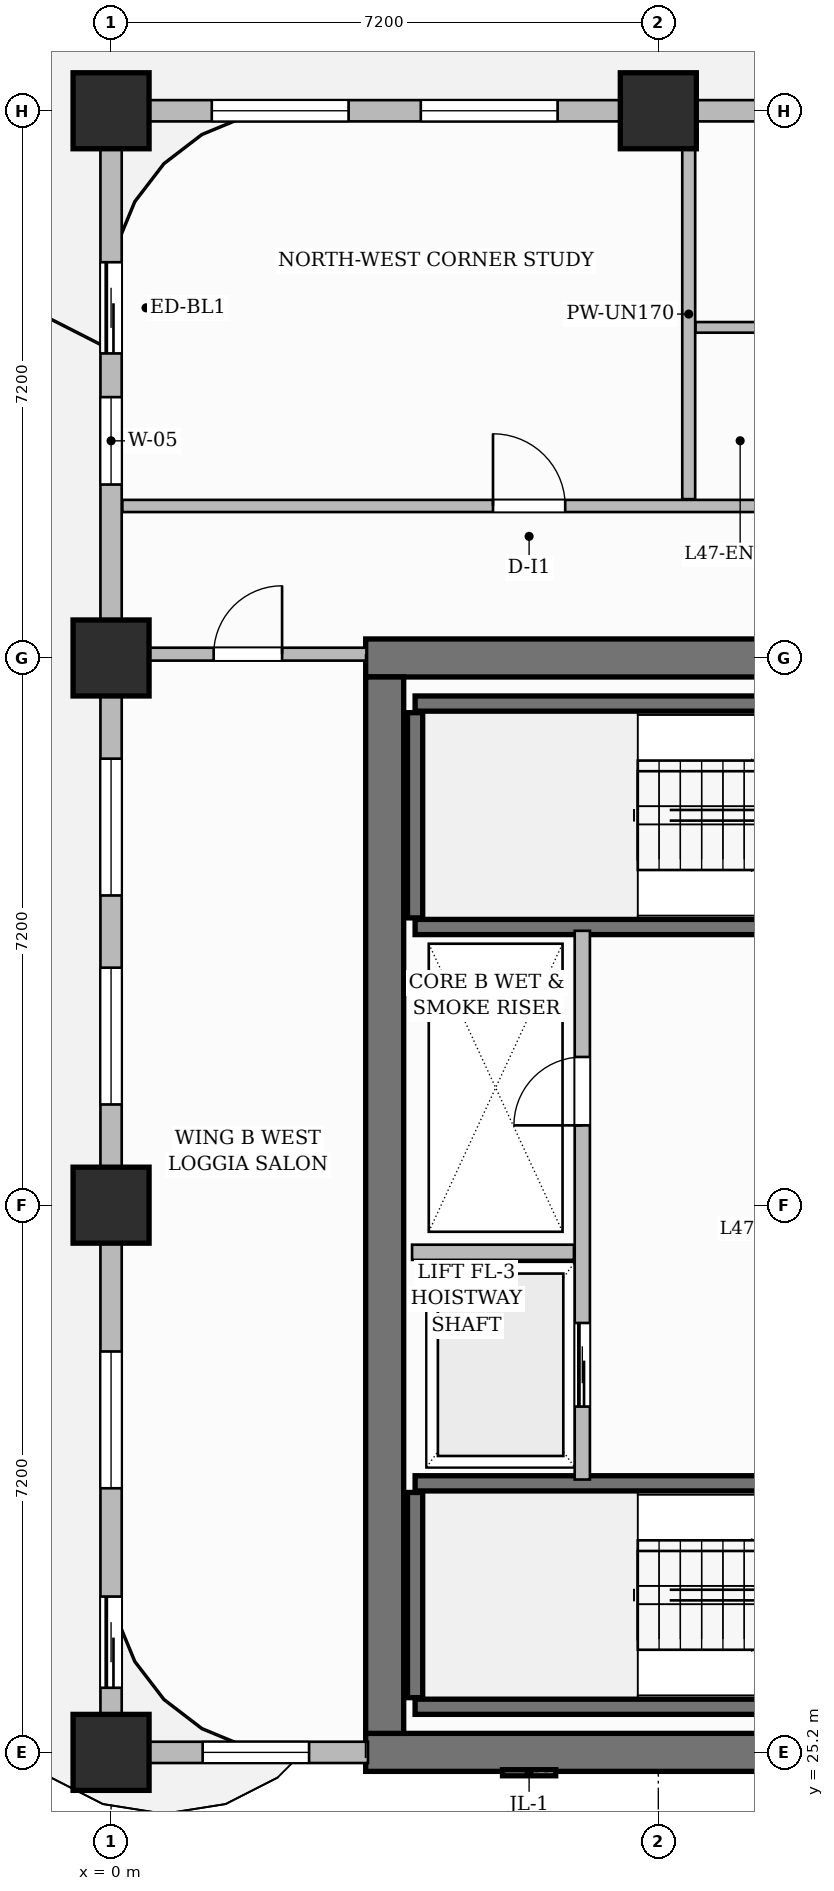
"""IFC4 building model, lengths in metres.
Left out: names, types, materials, properties, quantities, classifications, styles, units other than length and angle.
Written with IfcOpenShell. Run it as: python <this file> out.ifc"""

import sys

from ifc_helpers import new_model, si_unit, direction, frame, frame_2d, origin, origin_2d, place, context, subcontext, project, spatial, rectangle, extrude, source, transform, mapped, element, fill, save


model = new_model("IFC4")
c1 = context("Model", 3, precision=1e-05, world=origin(), true_north=direction((0.0, 1.0)))
c2 = subcontext(c1, "Body", "Model", "MODEL_VIEW")
j1 = project(units=[si_unit("LENGTHUNIT", "METRE"), si_unit("PLANEANGLEUNIT", "RADIAN")], contexts=[c1])
p1 = place(None, origin())
s1 = spatial("IfcSite", under=j1, at=p1, CompositionType="ELEMENT")
p2 = place(p1, origin())
s2 = spatial("IfcBuilding", under=s1, at=p2, CompositionType="ELEMENT")
p3 = place(p2, frame((0.0, 0.0, 188.8)))
s3 = spatial("IfcBuildingStorey", under=s2, at=p3, CompositionType="ELEMENT", Elevation=188.8)
for number, where, z_axis, x_axis in (
    (1, (3.35, 25.2, 0.0), (0.0, 0.0, 1.0), (1.0, 0.0, 0.0)),
    (2, (3.35, 39.6, 0.0), (0.0, 0.0, 1.0), (1.0, 0.0, 0.0)),
):
    element("IfcWall", number, at=place(p3, frame(where, z_axis=z_axis, x_axis=x_axis)), inside=s3, PredefinedType="SHEAR", context=c2, shape_type="SweptSolid", body=[
        extrude(rectangle(XDim=8.3, YDim=0.5, at=frame_2d((4.15, 0.0))), origin(), (0.0, 0.0, 1.0), 3.85),
    ])
p4 = place(p3, frame((3.6, 25.45, 0.0), z_axis=(0.0, 0.0, 1.0), x_axis=(0.0, 1.0, 0.0)))
e3 = element("IfcWall", 3, at=p4, inside=s3, PredefinedType="SHEAR", context=c2, shape_type="SweptSolid", body=[
    extrude(rectangle(XDim=13.9, YDim=0.5, at=frame_2d((6.95, 0.0))), origin(), (0.0, 0.0, 1.0), 3.85),
])
m1 = source(origin(), c2, "Body", "SweptSolid", [
    extrude(rectangle(XDim=1.0, YDim=1.0, at=origin_2d()), origin(), (0.0, 0.0, 1.0), 3.85),
])
for number, where, z_axis, x_axis in (
    (4, (0.0, 25.2, 0.0), (0.0, 0.0, 1.0), (1.0, 0.0, 0.0)),
    (5, (0.0, 32.4, 0.0), (0.0, 0.0, 1.0), (1.0, 0.0, 0.0)),
    (6, (0.0, 39.6, 0.0), (0.0, 0.0, 1.0), (1.0, 0.0, 0.0)),
    (7, (0.0, 46.8, 0.0), (0.0, 0.0, 1.0), (1.0, 0.0, 0.0)),
    (8, (7.2, 46.8, 0.0), (0.0, 0.0, 1.0), (1.0, 0.0, 0.0)),
):
    element("IfcColumn", number, at=place(p3, frame(where, z_axis=z_axis, x_axis=x_axis)), inside=s3, PredefinedType="COLUMN", context=c2, shape_type="MappedRepresentation", body=[
        mapped(m1, transform((0.0, 0.0, 0.0), scale=1.0)),
    ])
p5 = place(p3, frame((4.0, 25.8, 0.0), z_axis=(0.0, 0.0, 1.0), x_axis=(1.0, 0.0, 0.0)))
e9 = element("IfcWall", 9, at=p5, inside=s3, PredefinedType="SHEAR", context=c2, shape_type="SweptSolid", body=[
    extrude(rectangle(XDim=7.1, YDim=0.2, at=frame_2d((3.55, 0.0))), origin(), (0.0, 0.0, 1.0), 3.85),
])
p6 = place(p3, frame((4.0, 25.92, 0.0), z_axis=(0.0, 0.0, 1.0), x_axis=(0.0, 1.0, 0.0)))
e10 = element("IfcWall", 10, at=p6, inside=s3, PredefinedType="SHEAR", context=c2, shape_type="SweptSolid", body=[
    extrude(rectangle(XDim=2.7, YDim=0.2, at=frame_2d((1.35, 0.0))), origin(), (0.0, 0.0, 1.0), 3.85),
])
p7 = place(p3, frame((4.0, 28.74, 0.0), z_axis=(0.0, 0.0, 1.0), x_axis=(1.0, 0.0, 0.0)))
e11 = element("IfcWall", 11, at=p7, inside=s3, PredefinedType="SHEAR", context=c2, shape_type="SweptSolid", body=[
    extrude(rectangle(XDim=7.1, YDim=0.2, at=frame_2d((3.55, 0.0))), origin(), (0.0, 0.0, 1.0), 3.85),
])
p8 = place(p7, frame((5.815, 0.0, 0.0)))
e12 = element("IfcOpeningElement", 12, at=p8, cuts=e11, PredefinedType="OPENING", context=c2, shape_type="SweptSolid", body=[
    extrude(rectangle(XDim=1.05, YDim=2.2, at=frame_2d((0.525, 1.1))), frame((0.0, 0.11, 0.0), z_axis=(0.0, -1.0, 0.0), x_axis=(1.0, 0.0, 0.0)), (0.0, 0.0, 1.0), 0.22),
])
p9 = place(p3, frame((4.0, 39.0, 0.0), z_axis=(0.0, 0.0, 1.0), x_axis=(1.0, 0.0, 0.0)))
e13 = element("IfcWall", 13, at=p9, inside=s3, PredefinedType="SHEAR", context=c2, shape_type="SweptSolid", body=[
    extrude(rectangle(XDim=7.1, YDim=0.2, at=frame_2d((3.55, 0.0))), origin(), (0.0, 0.0, 1.0), 3.85),
])
p10 = place(p3, frame((4.0, 36.18, 0.0), z_axis=(0.0, 0.0, 1.0), x_axis=(0.0, 1.0, 0.0)))
e14 = element("IfcWall", 14, at=p10, inside=s3, PredefinedType="SHEAR", context=c2, shape_type="SweptSolid", body=[
    extrude(rectangle(XDim=2.7, YDim=0.2, at=frame_2d((1.35, 0.0))), origin(), (0.0, 0.0, 1.0), 3.85),
])
p11 = place(p3, frame((4.0, 36.06, 0.0), z_axis=(0.0, 0.0, 1.0), x_axis=(1.0, 0.0, 0.0)))
e15 = element("IfcWall", 15, at=p11, inside=s3, PredefinedType="SHEAR", context=c2, shape_type="SweptSolid", body=[
    extrude(rectangle(XDim=7.1, YDim=0.2, at=frame_2d((3.55, 0.0))), origin(), (0.0, 0.0, 1.0), 3.85),
])
p12 = place(p11, frame((5.815, 0.0, 0.0)))
e16 = element("IfcOpeningElement", 16, at=p12, cuts=e15, PredefinedType="OPENING", context=c2, shape_type="SweptSolid", body=[
    extrude(rectangle(XDim=1.05, YDim=2.2, at=frame_2d((0.525, 1.1))), frame((0.0, 0.11, 0.0), z_axis=(0.0, -1.0, 0.0), x_axis=(1.0, 0.0, 0.0)), (0.0, 0.0, 1.0), 0.22),
])
p13 = place(p3, frame((6.2, 28.79, 0.0), z_axis=(0.0, 0.0, 1.0), x_axis=(0.0, 1.0, 0.0)))
e17 = element("IfcWall", 17, at=p13, inside=s3, PredefinedType="PARTITIONING", context=c2, shape_type="SweptSolid", body=[
    extrude(rectangle(XDim=7.22, YDim=0.2, at=frame_2d((3.61, 0.0))), origin(), (0.0, 0.0, 1.0), 3.6),
])
p14 = place(p13, frame((4.66, 0.0, 0.0)))
e18 = element("IfcOpeningElement", 18, at=p14, cuts=e17, PredefinedType="OPENING", context=c2, shape_type="SweptSolid", body=[
    extrude(rectangle(XDim=0.9, YDim=2.1, at=frame_2d((0.45, 1.05))), frame((0.0, 0.11, 0.0), z_axis=(0.0, -1.0, 0.0), x_axis=(1.0, 0.0, 0.0)), (0.0, 0.0, 1.0), 0.22),
])
p15 = place(p13, frame((0.96, 0.0, 0.0)))
e19 = element("IfcOpeningElement", 19, at=p15, cuts=e17, PredefinedType="OPENING", context=c2, shape_type="SweptSolid", body=[
    extrude(rectangle(XDim=1.1, YDim=2.2, at=frame_2d((0.55, 1.1))), frame((0.0, 0.11, 0.0), z_axis=(0.0, -1.0, 0.0), x_axis=(1.0, 0.0, 0.0)), (0.0, 0.0, 1.0), 0.22),
])
p16 = place(p3, frame((3.96, 31.78, 0.0), z_axis=(0.0, 0.0, 1.0), x_axis=(1.0, 0.0, 0.0)))
e20 = element("IfcWall", 20, at=p16, inside=s3, PredefinedType="PARTITIONING", context=c2, shape_type="SweptSolid", body=[
    extrude(rectangle(XDim=2.13, YDim=0.2, at=frame_2d((1.065, 0.0))), origin(), (0.0, 0.0, 1.0), 3.6),
])
p17 = place(p3, frame((0.24, 39.65, 0.0), z_axis=(0.0, 0.0, 1.0), x_axis=(1.0, 0.0, 0.0)))
e21 = element("IfcWall", 21, at=p17, inside=s3, PredefinedType="PARTITIONING", context=c2, shape_type="SweptSolid", body=[
    extrude(rectangle(XDim=3.12, YDim=0.17, at=frame_2d((1.56, 0.0))), origin(), (0.0, 0.0, 1.0), 3.6),
])
p18 = place(p17, frame((1.11, 0.0, 0.0)))
e22 = element("IfcOpeningElement", 22, at=p18, cuts=e21, PredefinedType="OPENING", context=c2, shape_type="SweptSolid", body=[
    extrude(rectangle(XDim=0.9, YDim=2.15, at=frame_2d((0.45, 1.075))), frame((0.0, 0.095, 0.0), z_axis=(0.0, -1.0, 0.0), x_axis=(1.0, 0.0, 0.0)), (0.0, 0.0, 1.0), 0.19),
])
p19 = place(p3, frame((7.6, 41.69, 0.0), z_axis=(0.0, 0.0, 1.0), x_axis=(0.0, 1.0, 0.0)))
e23 = element("IfcWall", 23, at=p19, inside=s3, PredefinedType="PARTITIONING", context=c2, shape_type="SweptSolid", body=[
    extrude(rectangle(XDim=4.87, YDim=0.17, at=frame_2d((2.435, 0.0))), origin(), (0.0, 0.0, 1.0), 3.6),
])
p20 = place(p3, frame((0.148, 41.6, 0.0), z_axis=(0.0, 0.0, 1.0), x_axis=(1.0, 0.0, 0.0)))
e24 = element("IfcWall", 24, at=p20, inside=s3, PredefinedType="PARTITIONING", context=c2, shape_type="SweptSolid", body=[
    extrude(rectangle(XDim=14.812, YDim=0.16, at=frame_2d((7.406, 0.0))), origin(), (0.0, 0.0, 1.0), 3.085),
])
p21 = place(p20, frame((4.877, 0.0, 0.0)))
e25 = element("IfcOpeningElement", 25, at=p21, cuts=e24, PredefinedType="OPENING", context=c2, shape_type="SweptSolid", body=[
    extrude(rectangle(XDim=0.95, YDim=2.15, at=frame_2d((0.475, 1.075))), frame((0.0, 0.09, 0.0), z_axis=(0.0, -1.0, 0.0), x_axis=(1.0, 0.0, 0.0)), (0.0, 0.0, 1.0), 0.18),
])
p22 = place(p3, frame((7.69, 43.95, 0.0), z_axis=(0.0, 0.0, 1.0), x_axis=(1.0, 0.0, 0.0)))
e26 = element("IfcWall", 26, at=p22, inside=s3, PredefinedType="PARTITIONING", context=c2, shape_type="SweptSolid", body=[
    extrude(rectangle(XDim=2.07, YDim=0.14, at=frame_2d((1.035, 0.0))), origin(), (0.0, 0.0, 1.0), 3.085),
])
p23 = place(p3, frame((0.0, 25.2, 0.0), z_axis=(0.0, 0.0, 1.0), x_axis=(1.0, 0.0, 0.0)))
e27 = element("IfcWall", 27, at=p23, inside=s3, PredefinedType="SOLIDWALL", context=c2, shape_type="SweptSolid", body=[
    extrude(rectangle(XDim=3.38, YDim=0.28, at=frame_2d((1.69, 0.0))), origin(), (0.0, 0.0, 1.0), 3.6),
])
p24 = place(p23, frame((1.205, 0.0, 0.8)))
e28 = element("IfcOpeningElement", 28, at=p24, cuts=e27, PredefinedType="OPENING", context=c2, shape_type="SweptSolid", body=[
    extrude(rectangle(XDim=1.4, YDim=1.85, at=frame_2d((0.7, 0.925))), frame((0.0, 0.15, 0.0), z_axis=(0.0, -1.0, 0.0), x_axis=(1.0, 0.0, 0.0)), (0.0, 0.0, 1.0), 0.3),
])
p25 = place(p3, frame((0.0, 25.25, 0.0), z_axis=(0.0, 0.0, 1.0), x_axis=(0.0, 1.0, 0.0)))
e29 = element("IfcWall", 29, at=p25, inside=s3, PredefinedType="SOLIDWALL", context=c2, shape_type="SweptSolid", body=[
    extrude(rectangle(XDim=21.5, YDim=0.28, at=frame_2d((10.75, 0.0))), origin(), (0.0, 0.0, 1.0), 3.085),
])
p26 = place(p25, frame((18.357, 0.0, 0.0)))
e30 = element("IfcOpeningElement", 30, at=p26, cuts=e29, PredefinedType="OPENING", context=c2, shape_type="SweptSolid", body=[
    extrude(rectangle(XDim=1.2, YDim=2.2, at=frame_2d((0.6, 1.1))), frame((0.0, 0.15, 0.0), z_axis=(0.0, -1.0, 0.0), x_axis=(1.0, 0.0, 0.0)), (0.0, 0.0, 1.0), 0.3),
])
p27 = place(p25, frame((0.8, 0.0, 0.0)))
e31 = element("IfcOpeningElement", 31, at=p27, cuts=e29, PredefinedType="OPENING", context=c2, shape_type="SweptSolid", body=[
    extrude(rectangle(XDim=1.2, YDim=2.2, at=frame_2d((0.6, 1.1))), frame((0.0, 0.15, 0.0), z_axis=(0.0, -1.0, 0.0), x_axis=(1.0, 0.0, 0.0)), (0.0, 0.0, 1.0), 0.3),
])
p28 = place(p25, frame((3.425, 0.0, 0.8)))
e32 = element("IfcOpeningElement", 32, at=p28, cuts=e29, PredefinedType="OPENING", context=c2, shape_type="SweptSolid", body=[
    extrude(rectangle(XDim=1.8, YDim=1.85, at=frame_2d((0.9, 0.925))), frame((0.0, 0.15, 0.0), z_axis=(0.0, -1.0, 0.0), x_axis=(1.0, 0.0, 0.0)), (0.0, 0.0, 1.0), 0.3),
])
p29 = place(p25, frame((8.475, 0.0, 0.8)))
e33 = element("IfcOpeningElement", 33, at=p29, cuts=e29, PredefinedType="OPENING", context=c2, shape_type="SweptSolid", body=[
    extrude(rectangle(XDim=1.8, YDim=1.85, at=frame_2d((0.9, 0.925))), frame((0.0, 0.15, 0.0), z_axis=(0.0, -1.0, 0.0), x_axis=(1.0, 0.0, 0.0)), (0.0, 0.0, 1.0), 0.3),
])
p30 = place(p25, frame((11.225, 0.0, 0.8)))
e34 = element("IfcOpeningElement", 34, at=p30, cuts=e29, PredefinedType="OPENING", context=c2, shape_type="SweptSolid", body=[
    extrude(rectangle(XDim=1.8, YDim=1.85, at=frame_2d((0.9, 0.925))), frame((0.0, 0.15, 0.0), z_axis=(0.0, -1.0, 0.0), x_axis=(1.0, 0.0, 0.0)), (0.0, 0.0, 1.0), 0.3),
])
p31 = place(p25, frame((16.632, 0.0, 0.8)))
e35 = element("IfcOpeningElement", 35, at=p31, cuts=e29, PredefinedType="OPENING", context=c2, shape_type="SweptSolid", body=[
    extrude(rectangle(XDim=1.15, YDim=1.8, at=frame_2d((0.575, 0.9))), frame((0.0, 0.15, 0.0), z_axis=(0.0, -1.0, 0.0), x_axis=(1.0, 0.0, 0.0)), (0.0, 0.0, 1.0), 0.3),
])
p32 = place(p3, frame((0.0, 46.8, 0.0), z_axis=(0.0, 0.0, 1.0), x_axis=(1.0, 0.0, 0.0)))
e36 = element("IfcWall", 36, at=p32, inside=s3, PredefinedType="SOLIDWALL", context=c2, shape_type="SweptSolid", body=[
    extrude(rectangle(XDim=18.0, YDim=0.28, at=frame_2d((9.0, 0.0))), origin(), (0.0, 0.0, 1.0), 3.085),
])
p33 = place(p32, frame((1.325, 0.0, 0.8)))
e37 = element("IfcOpeningElement", 37, at=p33, cuts=e36, PredefinedType="OPENING", context=c2, shape_type="SweptSolid", body=[
    extrude(rectangle(XDim=1.8, YDim=1.85, at=frame_2d((0.9, 0.925))), frame((0.0, 0.15, 0.0), z_axis=(0.0, -1.0, 0.0), x_axis=(1.0, 0.0, 0.0)), (0.0, 0.0, 1.0), 0.3),
])
p34 = place(p32, frame((4.075, 0.0, 0.8)))
e38 = element("IfcOpeningElement", 38, at=p34, cuts=e36, PredefinedType="OPENING", context=c2, shape_type="SweptSolid", body=[
    extrude(rectangle(XDim=1.8, YDim=1.85, at=frame_2d((0.9, 0.925))), frame((0.0, 0.15, 0.0), z_axis=(0.0, -1.0, 0.0), x_axis=(1.0, 0.0, 0.0)), (0.0, 0.0, 1.0), 0.3),
])
p35 = place(p32, frame((8.525, 0.0, 0.8)))
e39 = element("IfcOpeningElement", 39, at=p35, cuts=e36, PredefinedType="OPENING", context=c2, shape_type="SweptSolid", body=[
    extrude(rectangle(XDim=1.8, YDim=1.85, at=frame_2d((0.9, 0.925))), frame((0.0, 0.15, 0.0), z_axis=(0.0, -1.0, 0.0), x_axis=(1.0, 0.0, 0.0)), (0.0, 0.0, 1.0), 0.3),
])
p36 = place(p32, frame((11.275, 0.0, 0.8)))
e40 = element("IfcOpeningElement", 40, at=p36, cuts=e36, PredefinedType="OPENING", context=c2, shape_type="SweptSolid", body=[
    extrude(rectangle(XDim=1.8, YDim=1.85, at=frame_2d((0.9, 0.925))), frame((0.0, 0.15, 0.0), z_axis=(0.0, -1.0, 0.0), x_axis=(1.0, 0.0, 0.0)), (0.0, 0.0, 1.0), 0.3),
])
p37 = place(p32, frame((15.5, 0.0, 0.8)))
e41 = element("IfcOpeningElement", 41, at=p37, cuts=e36, PredefinedType="OPENING", context=c2, shape_type="SweptSolid", body=[
    extrude(rectangle(XDim=1.4, YDim=1.85, at=frame_2d((0.7, 0.925))), frame((0.0, 0.15, 0.0), z_axis=(0.0, -1.0, 0.0), x_axis=(1.0, 0.0, 0.0)), (0.0, 0.0, 1.0), 0.3),
])
m2 = source(origin(), c2, "Body", "SweptSolid", [
    extrude(rectangle(XDim=0.9, YDim=2.1, at=frame_2d((0.45, 1.05))), frame((0.0, 0.025, 0.0), z_axis=(0.0, -1.0, 0.0), x_axis=(1.0, 0.0, 0.0)), (0.0, 0.0, 1.0), 0.05),
])
p38 = place(p14, origin())
e42 = element("IfcDoor", 42, at=p38, inside=s3, OperationType="SINGLE_SWING_LEFT", PredefinedType="DOOR", context=c2, shape_type="MappedRepresentation", body=[
    mapped(m2, transform((0.0, 0.0, 0.0), scale=1.0)),
])
fill(e18, e42)
m3 = source(origin(), c2, "Body", "SweptSolid", [
    extrude(rectangle(XDim=0.9, YDim=2.15, at=frame_2d((0.45, 1.075))), frame((0.0, 0.025, 0.0), z_axis=(0.0, -1.0, 0.0), x_axis=(1.0, 0.0, 0.0)), (0.0, 0.0, 1.0), 0.05),
])
p39 = place(p18, origin())
e43 = element("IfcDoor", 43, at=p39, inside=s3, OperationType="SINGLE_SWING_RIGHT", PredefinedType="DOOR", context=c2, shape_type="MappedRepresentation", body=[
    mapped(m3, transform((0.0, 0.0, 0.0), scale=1.0)),
])
fill(e22, e43)
m4 = source(origin(), c2, "Body", "SweptSolid", [
    extrude(rectangle(XDim=0.95, YDim=2.15, at=frame_2d((0.475, 1.075))), frame((0.0, 0.025, 0.0), z_axis=(0.0, -1.0, 0.0), x_axis=(1.0, 0.0, 0.0)), (0.0, 0.0, 1.0), 0.05),
])
p40 = place(p21, origin())
e44 = element("IfcDoor", 44, at=p40, inside=s3, OperationType="SINGLE_SWING_LEFT", PredefinedType="DOOR", context=c2, shape_type="MappedRepresentation", body=[
    mapped(m4, transform((0.0, 0.0, 0.0), scale=1.0)),
])
fill(e25, e44)
m5 = source(origin(), c2, "Body", "SweptSolid", [
    extrude(rectangle(XDim=1.1, YDim=2.2, at=frame_2d((0.55, 1.1))), frame((0.0, 0.025, 0.0), z_axis=(0.0, -1.0, 0.0), x_axis=(1.0, 0.0, 0.0)), (0.0, 0.0, 1.0), 0.05),
])
p41 = place(p15, origin())
e45 = element("IfcDoor", 45, at=p41, inside=s3, OperationType="SLIDING_TO_LEFT", PredefinedType="DOOR", context=c2, shape_type="MappedRepresentation", body=[
    mapped(m5, transform((0.0, 0.0, 0.0), scale=1.0)),
])
fill(e19, e45)
m6 = source(origin(), c2, "Body", "SweptSolid", [
    extrude(rectangle(XDim=1.2, YDim=2.2, at=frame_2d((0.6, 1.1))), frame((0.0, 0.025, 0.0), z_axis=(0.0, -1.0, 0.0), x_axis=(1.0, 0.0, 0.0)), (0.0, 0.0, 1.0), 0.05),
])
p42 = place(p26, origin())
e46 = element("IfcDoor", 46, at=p42, inside=s3, OperationType="SLIDING_TO_LEFT", PredefinedType="DOOR", context=c2, shape_type="MappedRepresentation", body=[
    mapped(m6, transform((0.0, 0.0, 0.0), scale=1.0)),
])
fill(e30, e46)
p43 = place(p27, origin())
e47 = element("IfcDoor", 47, at=p43, inside=s3, OperationType="SLIDING_TO_LEFT", PredefinedType="DOOR", context=c2, shape_type="MappedRepresentation", body=[
    mapped(m6, transform((0.0, 0.0, 0.0), scale=1.0)),
])
fill(e31, e47)
m7 = source(origin(), c2, "Body", "SweptSolid", [
    extrude(rectangle(XDim=1.4, YDim=1.85, at=frame_2d((0.7, 0.925))), frame((0.0, 0.03, 0.0), z_axis=(0.0, -1.0, 0.0), x_axis=(1.0, 0.0, 0.0)), (0.0, 0.0, 1.0), 0.06),
])
p44 = place(p24, origin())
e48 = element("IfcWindow", 48, at=p44, inside=s3, PartitioningType="SINGLE_PANEL", PredefinedType="WINDOW", context=c2, shape_type="MappedRepresentation", body=[
    mapped(m7, transform((0.0, 0.0, 0.0), scale=1.0)),
])
fill(e28, e48)
m8 = source(origin(), c2, "Body", "SweptSolid", [
    extrude(rectangle(XDim=1.8, YDim=1.85, at=frame_2d((0.9, 0.925))), frame((0.0, 0.03, 0.0), z_axis=(0.0, -1.0, 0.0), x_axis=(1.0, 0.0, 0.0)), (0.0, 0.0, 1.0), 0.06),
])
p45 = place(p28, origin())
e49 = element("IfcWindow", 49, at=p45, inside=s3, PartitioningType="DOUBLE_PANEL_VERTICAL", PredefinedType="WINDOW", context=c2, shape_type="MappedRepresentation", body=[
    mapped(m8, transform((0.0, 0.0, 0.0), scale=1.0)),
])
fill(e32, e49)
p46 = place(p29, origin())
e50 = element("IfcWindow", 50, at=p46, inside=s3, PartitioningType="DOUBLE_PANEL_VERTICAL", PredefinedType="WINDOW", context=c2, shape_type="MappedRepresentation", body=[
    mapped(m8, transform((0.0, 0.0, 0.0), scale=1.0)),
])
fill(e33, e50)
p47 = place(p30, origin())
e51 = element("IfcWindow", 51, at=p47, inside=s3, PartitioningType="DOUBLE_PANEL_VERTICAL", PredefinedType="WINDOW", context=c2, shape_type="MappedRepresentation", body=[
    mapped(m8, transform((0.0, 0.0, 0.0), scale=1.0)),
])
fill(e34, e51)
m9 = source(origin(), c2, "Body", "SweptSolid", [
    extrude(rectangle(XDim=1.15, YDim=1.8, at=frame_2d((0.575, 0.9))), frame((0.0, 0.03, 0.0), z_axis=(0.0, -1.0, 0.0), x_axis=(1.0, 0.0, 0.0)), (0.0, 0.0, 1.0), 0.06),
])
p48 = place(p31, origin())
e52 = element("IfcWindow", 52, at=p48, inside=s3, PartitioningType="SINGLE_PANEL", PredefinedType="WINDOW", context=c2, shape_type="MappedRepresentation", body=[
    mapped(m9, transform((0.0, 0.0, 0.0), scale=1.0)),
])
fill(e35, e52)
p49 = place(p33, origin())
e53 = element("IfcWindow", 53, at=p49, inside=s3, PartitioningType="DOUBLE_PANEL_VERTICAL", PredefinedType="WINDOW", context=c2, shape_type="MappedRepresentation", body=[
    mapped(m8, transform((0.0, 0.0, 0.0), scale=1.0)),
])
fill(e37, e53)
p50 = place(p34, origin())
e54 = element("IfcWindow", 54, at=p50, inside=s3, PartitioningType="DOUBLE_PANEL_VERTICAL", PredefinedType="WINDOW", context=c2, shape_type="MappedRepresentation", body=[
    mapped(m8, transform((0.0, 0.0, 0.0), scale=1.0)),
])
fill(e38, e54)
save(model, sys.argv[1])
